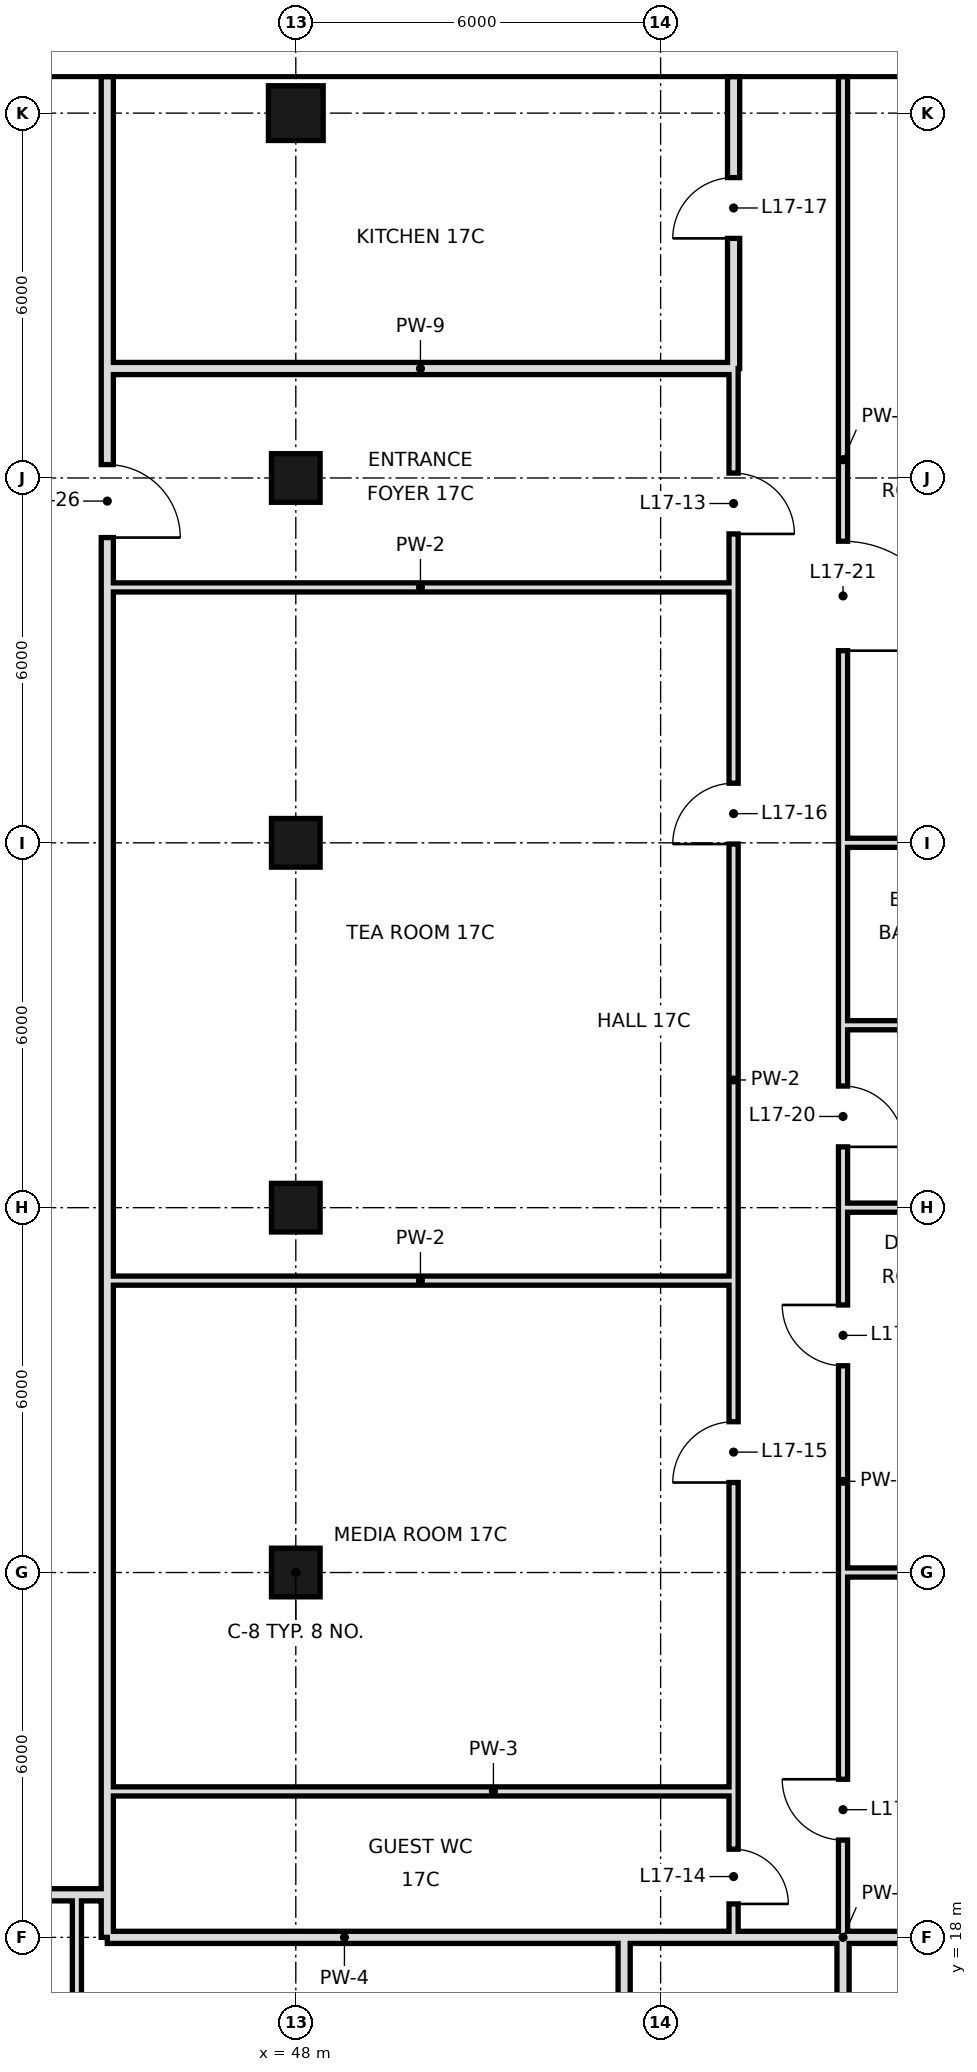
"""IFC4 building model, lengths in metres.
Left out: names, types, materials, properties, quantities, classifications, styles, units other than length and angle.
Written with IfcOpenShell. Run it as: python <this file> out.ifc"""

import sys

from ifc_helpers import new_model, si_unit, direction, frame, frame_2d, origin, origin_2d, place, context, subcontext, project, spatial, rectangle, hollow_rectangle, extrude, element, fill, save


model = new_model("IFC4")
c1 = context("Model", 3, precision=1e-05, world=origin(), true_north=direction((0.0, 1.0)))
c2 = subcontext(c1, "Body", "Model", "MODEL_VIEW")
j1 = project(units=[si_unit("LENGTHUNIT", "METRE"), si_unit("PLANEANGLEUNIT", "RADIAN")], contexts=[c1])
p1 = place(None, origin())
s1 = spatial("IfcSite", under=j1, at=p1, CompositionType="ELEMENT")
p2 = place(p1, origin())
s2 = spatial("IfcBuilding", under=s1, at=p2, CompositionType="ELEMENT")
p3 = place(p2, frame((0.0, 0.0, 82.2)))
s3 = spatial("IfcBuildingStorey", under=s2, at=p3, CompositionType="ELEMENT", Elevation=82.2)
for number, where, z_axis, x_axis in (
    (1, (48.0, 24.0, 0.0), (0.0, 0.0, 1.0), (1.0, 0.0, 0.0)),
    (2, (48.0, 30.0, 0.0), (0.0, 0.0, 1.0), (1.0, 0.0, 0.0)),
    (3, (48.0, 36.0, 0.0), (0.0, 0.0, 1.0), (1.0, 0.0, 0.0)),
    (4, (48.0, 42.0, 0.0), (0.0, 0.0, 1.0), (1.0, 0.0, 0.0)),
):
    element("IfcColumn", number, at=place(p3, frame(where, z_axis=z_axis, x_axis=x_axis)), inside=s3, PredefinedType="COLUMN", context=c2, shape_type="SweptSolid", body=[
        extrude(hollow_rectangle(XDim=0.8, YDim=0.8, WallThickness=0.04, at=origin_2d()), origin(), (0.0, 0.0, 1.0), 3.6),
    ])
p4 = place(p3, frame((48.0, 48.0, 0.0), z_axis=(0.0, 0.0, 1.0), x_axis=(1.0, 0.0, 0.0)))
e5 = element("IfcColumn", 5, at=p4, inside=s3, PredefinedType="COLUMN", context=c2, shape_type="SweptSolid", body=[
    extrude(hollow_rectangle(XDim=0.9, YDim=0.9, WallThickness=0.045, at=origin_2d()), origin(), (0.0, 0.0, 1.0), 3.6),
])
p5 = place(p3, frame((44.4, 10.8, 0.0), z_axis=(0.0, 0.0, 1.0), x_axis=(0.0, 1.0, 0.0)))
e6 = element("IfcWall", 6, at=p5, inside=s3, PredefinedType="PARTITIONING", context=c2, shape_type="SweptSolid", body=[
    extrude(rectangle(XDim=7.9, YDim=0.15, at=frame_2d((3.95, 0.0))), origin(), (0.0, 0.0, 1.0), 3.42),
])
p6 = place(p3, frame((44.9, 18.7, 0.0), z_axis=(0.0, 0.0, 1.0), x_axis=(0.0, 1.0, 0.0)))
e7 = element("IfcWall", 7, at=p6, inside=s3, PredefinedType="SOLIDWALL", context=c2, shape_type="SweptSolid", body=[
    extrude(rectangle(XDim=25.1, YDim=0.2, at=frame_2d((12.55, 0.0))), origin(), (0.0, 0.0, 1.0), 2.97),
])
p7 = place(p6, frame((22.32, 0.0, 0.0)))
e8 = element("IfcOpeningElement", 8, at=p7, cuts=e7, PredefinedType="OPENING", context=c2, shape_type="SweptSolid", body=[
    extrude(rectangle(XDim=1.2, YDim=2.4, at=frame_2d((0.6, 1.2))), frame((0.0, 0.11, 0.0), z_axis=(0.0, -1.0, 0.0), x_axis=(1.0, 0.0, 0.0)), (0.0, 0.0, 1.0), 0.22),
])
p8 = place(p3, frame((44.9, 43.8, 0.0), z_axis=(0.0, 0.0, 1.0), x_axis=(0.0, 1.0, 0.0)))
e9 = element("IfcWall", 9, at=p8, inside=s3, PredefinedType="SOLIDWALL", context=c2, shape_type="SweptSolid", body=[
    extrude(rectangle(XDim=4.8, YDim=0.2, at=frame_2d((2.4, 0.0))), origin(), (0.0, 0.0, 1.0), 2.72),
])
p9 = place(p3, frame((44.9, 18.0, 0.0), z_axis=(0.0, 0.0, 1.0), x_axis=(0.0, 1.0, 0.0)))
e10 = element("IfcWall", 10, at=p9, inside=s3, PredefinedType="SOLIDWALL", context=c2, shape_type="SweptSolid", body=[
    extrude(rectangle(XDim=0.7, YDim=0.2, at=frame_2d((0.35, 0.0))), origin(), (0.0, 0.0, 1.0), 2.97),
])
p10 = place(p3, frame((53.4, 10.8, 0.0), z_axis=(0.0, 0.0, 1.0), x_axis=(0.0, 1.0, 0.0)))
e11 = element("IfcWall", 11, at=p10, inside=s3, PredefinedType="SOLIDWALL", context=c2, shape_type="SweptSolid", body=[
    extrude(rectangle(XDim=7.2, YDim=0.2, at=frame_2d((3.6, 0.0))), origin(), (0.0, 0.0, 1.0), 2.52),
])
p11 = place(p3, frame((55.2, 43.8, 0.0), z_axis=(0.0, 0.0, 1.0), x_axis=(0.0, 1.0, 0.0)))
e12 = element("IfcWall", 12, at=p11, inside=s3, PredefinedType="SOLIDWALL", context=c2, shape_type="SweptSolid", body=[
    extrude(rectangle(XDim=4.8, YDim=0.2, at=frame_2d((2.4, 0.0))), origin(), (0.0, 0.0, 1.0), 2.72),
])
p12 = place(p11, frame((2.14, 0.0, 0.0)))
e13 = element("IfcOpeningElement", 13, at=p12, cuts=e12, PredefinedType="OPENING", context=c2, shape_type="SweptSolid", body=[
    extrude(rectangle(XDim=1.0, YDim=2.4, at=frame_2d((0.5, 1.2))), frame((0.0, 0.11, 0.0), z_axis=(0.0, -1.0, 0.0), x_axis=(1.0, 0.0, 0.0)), (0.0, 0.0, 1.0), 0.22),
])
p13 = place(p3, frame((55.2, 20.4, 0.0), z_axis=(0.0, 0.0, 1.0), x_axis=(0.0, 1.0, 0.0)))
e14 = element("IfcWall", 14, at=p13, inside=s3, PredefinedType="PARTITIONING", context=c2, shape_type="SweptSolid", body=[
    extrude(rectangle(XDim=23.4, YDim=0.15, at=frame_2d((11.7, 0.0))), origin(), (0.0, 0.0, 1.0), 3.42),
])
p14 = place(p13, frame((20.68, 0.0, 0.0)))
e15 = element("IfcOpeningElement", 15, at=p14, cuts=e14, PredefinedType="OPENING", context=c2, shape_type="SweptSolid", body=[
    extrude(rectangle(XDim=1.0, YDim=2.4, at=frame_2d((0.5, 1.2))), frame((0.0, 0.085, 0.0), z_axis=(0.0, -1.0, 0.0), x_axis=(1.0, 0.0, 0.0)), (0.0, 0.0, 1.0), 0.17),
])
p15 = place(p13, frame((5.08, 0.0, 0.0)))
e16 = element("IfcOpeningElement", 16, at=p15, cuts=e14, PredefinedType="OPENING", context=c2, shape_type="SweptSolid", body=[
    extrude(rectangle(XDim=1.0, YDim=2.4, at=frame_2d((0.5, 1.2))), frame((0.0, 0.085, 0.0), z_axis=(0.0, -1.0, 0.0), x_axis=(1.0, 0.0, 0.0)), (0.0, 0.0, 1.0), 0.17),
])
p16 = place(p13, frame((15.58, 0.0, 0.0)))
e17 = element("IfcOpeningElement", 17, at=p16, cuts=e14, PredefinedType="OPENING", context=c2, shape_type="SweptSolid", body=[
    extrude(rectangle(XDim=1.0, YDim=2.4, at=frame_2d((0.5, 1.2))), frame((0.0, 0.085, 0.0), z_axis=(0.0, -1.0, 0.0), x_axis=(1.0, 0.0, 0.0)), (0.0, 0.0, 1.0), 0.17),
])
p17 = place(p3, frame((55.2, 18.0, 0.0), z_axis=(0.0, 0.0, 1.0), x_axis=(0.0, 1.0, 0.0)))
e18 = element("IfcWall", 18, at=p17, inside=s3, PredefinedType="PARTITIONING", context=c2, shape_type="SweptSolid", body=[
    extrude(rectangle(XDim=2.4, YDim=0.15, at=frame_2d((1.2, 0.0))), origin(), (0.0, 0.0, 1.0), 3.42),
])
p18 = place(p17, frame((0.55, 0.0, 0.0)))
e19 = element("IfcOpeningElement", 19, at=p18, cuts=e18, PredefinedType="OPENING", context=c2, shape_type="SweptSolid", body=[
    extrude(rectangle(XDim=0.9, YDim=2.4, at=frame_2d((0.45, 1.2))), frame((0.0, 0.085, 0.0), z_axis=(0.0, -1.0, 0.0), x_axis=(1.0, 0.0, 0.0)), (0.0, 0.0, 1.0), 0.17),
])
p19 = place(p3, frame((57.0, 10.8, 0.0), z_axis=(0.0, 0.0, 1.0), x_axis=(0.0, 1.0, 0.0)))
e20 = element("IfcWall", 20, at=p19, inside=s3, PredefinedType="SOLIDWALL", context=c2, shape_type="SweptSolid", body=[
    extrude(rectangle(XDim=7.2, YDim=0.2, at=frame_2d((3.6, 0.0))), origin(), (0.0, 0.0, 1.0), 2.52),
])
p20 = place(p3, frame((57.0, 18.0, 0.0), z_axis=(0.0, 0.0, 1.0), x_axis=(0.0, 1.0, 0.0)))
e21 = element("IfcWall", 21, at=p20, inside=s3, PredefinedType="PARTITIONING", context=c2, shape_type="SweptSolid", body=[
    extrude(rectangle(XDim=15.0, YDim=0.15, at=frame_2d((7.5, 0.0))), origin(), (0.0, 0.0, 1.0), 3.42),
])
p21 = place(p20, frame((1.6, 0.0, 0.0)))
e22 = element("IfcOpeningElement", 22, at=p21, cuts=e21, PredefinedType="OPENING", context=c2, shape_type="SweptSolid", body=[
    extrude(rectangle(XDim=1.0, YDim=2.4, at=frame_2d((0.5, 1.2))), frame((0.0, 0.085, 0.0), z_axis=(0.0, -1.0, 0.0), x_axis=(1.0, 0.0, 0.0)), (0.0, 0.0, 1.0), 0.17),
])
p22 = place(p20, frame((9.4, 0.0, 0.0)))
e23 = element("IfcOpeningElement", 23, at=p22, cuts=e21, PredefinedType="OPENING", context=c2, shape_type="SweptSolid", body=[
    extrude(rectangle(XDim=1.0, YDim=2.4, at=frame_2d((0.5, 1.2))), frame((0.0, 0.085, 0.0), z_axis=(0.0, -1.0, 0.0), x_axis=(1.0, 0.0, 0.0)), (0.0, 0.0, 1.0), 0.17),
])
p23 = place(p20, frame((13.0, 0.0, 0.0)))
e24 = element("IfcOpeningElement", 24, at=p23, cuts=e21, PredefinedType="OPENING", context=c2, shape_type="SweptSolid", body=[
    extrude(rectangle(XDim=1.0, YDim=2.4, at=frame_2d((0.5, 1.2))), frame((0.0, 0.085, 0.0), z_axis=(0.0, -1.0, 0.0), x_axis=(1.0, 0.0, 0.0)), (0.0, 0.0, 1.0), 0.17),
])
p24 = place(p3, frame((57.0, 36.0, 0.0), z_axis=(0.0, 0.0, 1.0), x_axis=(0.0, 1.0, 0.0)))
e25 = element("IfcWall", 25, at=p24, inside=s3, PredefinedType="PARTITIONING", context=c2, shape_type="SweptSolid", body=[
    extrude(rectangle(XDim=12.6, YDim=0.15, at=frame_2d((6.3, 0.0))), origin(), (0.0, 0.0, 1.0), 3.42),
])
p25 = place(p24, frame((3.16, 0.0, 0.0)))
e26 = element("IfcOpeningElement", 26, at=p25, cuts=e25, PredefinedType="OPENING", context=c2, shape_type="SweptSolid", body=[
    extrude(rectangle(XDim=1.8, YDim=2.4, at=frame_2d((0.9, 1.2))), frame((0.0, 0.085, 0.0), z_axis=(0.0, -1.0, 0.0), x_axis=(1.0, 0.0, 0.0)), (0.0, 0.0, 1.0), 0.17),
])
p26 = place(p3, frame((57.0, 33.0, 0.0), z_axis=(0.0, 0.0, 1.0), x_axis=(0.0, 1.0, 0.0)))
e27 = element("IfcWall", 27, at=p26, inside=s3, PredefinedType="PARTITIONING", context=c2, shape_type="SweptSolid", body=[
    extrude(rectangle(XDim=3.0, YDim=0.15, at=frame_2d((1.5, 0.0))), origin(), (0.0, 0.0, 1.0), 3.42),
])
p27 = place(p3, frame((53.4, 18.0, 0.0), z_axis=(0.0, 0.0, 1.0), x_axis=(1.0, 0.0, 0.0)))
e28 = element("IfcWall", 28, at=p27, inside=s3, PredefinedType="SOLIDWALL", context=c2, shape_type="SweptSolid", body=[
    extrude(rectangle(XDim=3.6, YDim=0.2, at=frame_2d((1.8, 0.0))), origin(), (0.0, 0.0, 1.0), 2.52),
])
p28 = place(p3, frame((44.9, 18.0, 0.0), z_axis=(0.0, 0.0, 1.0), x_axis=(1.0, 0.0, 0.0)))
e29 = element("IfcWall", 29, at=p28, inside=s3, PredefinedType="SOLIDWALL", context=c2, shape_type="SweptSolid", body=[
    extrude(rectangle(XDim=8.5, YDim=0.2, at=frame_2d((4.25, 0.0))), origin(), (0.0, 0.0, 1.0), 2.52),
])
p29 = place(p3, frame((57.0, 18.0, 0.0), z_axis=(0.0, 0.0, 1.0), x_axis=(1.0, 0.0, 0.0)))
e30 = element("IfcWall", 30, at=p29, inside=s3, PredefinedType="SOLIDWALL", context=c2, shape_type="SweptSolid", body=[
    extrude(rectangle(XDim=9.6, YDim=0.2, at=frame_2d((4.8, 0.0))), origin(), (0.0, 0.0, 1.0), 2.52),
])
p30 = place(p3, frame((3.1, 18.7, 0.0), z_axis=(0.0, 0.0, 1.0), x_axis=(1.0, 0.0, 0.0)))
e31 = element("IfcWall", 31, at=p30, inside=s3, PredefinedType="SOLIDWALL", context=c2, shape_type="SweptSolid", body=[
    extrude(rectangle(XDim=41.8, YDim=0.2, at=frame_2d((20.9, 0.0))), origin(), (0.0, 0.0, 1.0), 2.72),
])
p31 = place(p30, frame((36.16, 0.0, 0.0)))
e32 = element("IfcOpeningElement", 32, at=p31, cuts=e31, PredefinedType="OPENING", context=c2, shape_type="SweptSolid", body=[
    extrude(rectangle(XDim=1.2, YDim=2.4, at=frame_2d((0.6, 1.2))), frame((0.0, 0.11, 0.0), z_axis=(0.0, -1.0, 0.0), x_axis=(1.0, 0.0, 0.0)), (0.0, 0.0, 1.0), 0.22),
])
p32 = place(p30, frame((15.55, 0.0, 0.0)))
e33 = element("IfcOpeningElement", 33, at=p32, cuts=e31, PredefinedType="OPENING", context=c2, shape_type="SweptSolid", body=[
    extrude(rectangle(XDim=1.8, YDim=2.4, at=frame_2d((0.9, 1.2))), frame((0.0, 0.11, 0.0), z_axis=(0.0, -1.0, 0.0), x_axis=(1.0, 0.0, 0.0)), (0.0, 0.0, 1.0), 0.22),
])
p33 = place(p3, frame((44.9, 20.4, 0.0), z_axis=(0.0, 0.0, 1.0), x_axis=(1.0, 0.0, 0.0)))
e34 = element("IfcWall", 34, at=p33, inside=s3, PredefinedType="PARTITIONING", context=c2, shape_type="SweptSolid", body=[
    extrude(rectangle(XDim=10.3, YDim=0.15, at=frame_2d((5.15, 0.0))), origin(), (0.0, 0.0, 1.0), 3.42),
])
p34 = place(p3, frame((57.0, 24.0, 0.0), z_axis=(0.0, 0.0, 1.0), x_axis=(1.0, 0.0, 0.0)))
e35 = element("IfcWall", 35, at=p34, inside=s3, PredefinedType="PARTITIONING", context=c2, shape_type="SweptSolid", body=[
    extrude(rectangle(XDim=9.0, YDim=0.15, at=frame_2d((4.5, 0.0))), origin(), (0.0, 0.0, 1.0), 2.52),
])
p35 = place(p3, frame((44.9, 28.8, 0.0), z_axis=(0.0, 0.0, 1.0), x_axis=(1.0, 0.0, 0.0)))
e36 = element("IfcWall", 36, at=p35, inside=s3, PredefinedType="PARTITIONING", context=c2, shape_type="SweptSolid", body=[
    extrude(rectangle(XDim=10.3, YDim=0.15, at=frame_2d((5.15, 0.0))), origin(), (0.0, 0.0, 1.0), 3.42),
])
p36 = place(p3, frame((57.0, 30.0, 0.0), z_axis=(0.0, 0.0, 1.0), x_axis=(1.0, 0.0, 0.0)))
e37 = element("IfcWall", 37, at=p36, inside=s3, PredefinedType="PARTITIONING", context=c2, shape_type="SweptSolid", body=[
    extrude(rectangle(XDim=9.6, YDim=0.15, at=frame_2d((4.8, 0.0))), origin(), (0.0, 0.0, 1.0), 2.52),
])
p37 = place(p3, frame((57.0, 33.0, 0.0), z_axis=(0.0, 0.0, 1.0), x_axis=(1.0, 0.0, 0.0)))
e38 = element("IfcWall", 38, at=p37, inside=s3, PredefinedType="PARTITIONING", context=c2, shape_type="SweptSolid", body=[
    extrude(rectangle(XDim=3.0, YDim=0.15, at=frame_2d((1.5, 0.0))), origin(), (0.0, 0.0, 1.0), 3.42),
])
p38 = place(p3, frame((57.0, 36.0, 0.0), z_axis=(0.0, 0.0, 1.0), x_axis=(1.0, 0.0, 0.0)))
e39 = element("IfcWall", 39, at=p38, inside=s3, PredefinedType="PARTITIONING", context=c2, shape_type="SweptSolid", body=[
    extrude(rectangle(XDim=3.0, YDim=0.15, at=frame_2d((1.5, 0.0))), origin(), (0.0, 0.0, 1.0), 2.52),
])
p39 = place(p3, frame((44.9, 40.2, 0.0), z_axis=(0.0, 0.0, 1.0), x_axis=(1.0, 0.0, 0.0)))
e40 = element("IfcWall", 40, at=p39, inside=s3, PredefinedType="PARTITIONING", context=c2, shape_type="SweptSolid", body=[
    extrude(rectangle(XDim=10.3, YDim=0.15, at=frame_2d((5.15, 0.0))), origin(), (0.0, 0.0, 1.0), 3.42),
])
p40 = place(p3, frame((44.9, 43.8, 0.0), z_axis=(0.0, 0.0, 1.0), x_axis=(1.0, 0.0, 0.0)))
e41 = element("IfcWall", 41, at=p40, inside=s3, PredefinedType="SOLIDWALL", context=c2, shape_type="SweptSolid", body=[
    extrude(rectangle(XDim=10.3, YDim=0.2, at=frame_2d((5.15, 0.0))), origin(), (0.0, 0.0, 1.0), 2.97),
])
p41 = place(p14, frame((1.0, 0.0, 0.0), z_axis=(0.0, 0.0, 1.0), x_axis=(-1.0, 0.0, 0.0)))
e42 = element("IfcDoor", 42, at=p41, inside=s3, OperationType="SINGLE_SWING_RIGHT", PredefinedType="DOOR", context=c2, shape_type="SweptSolid", body=[
    extrude(rectangle(XDim=1.0, YDim=2.4, at=frame_2d((0.5, 1.2))), frame((0.0, 0.025, 0.0), z_axis=(0.0, -1.0, 0.0), x_axis=(1.0, 0.0, 0.0)), (0.0, 0.0, 1.0), 0.05),
])
fill(e15, e42)
p42 = place(p18, frame((0.9, 0.0, 0.0), z_axis=(0.0, 0.0, 1.0), x_axis=(-1.0, 0.0, 0.0)))
e43 = element("IfcDoor", 43, at=p42, inside=s3, OperationType="SINGLE_SWING_RIGHT", PredefinedType="DOOR", context=c2, shape_type="SweptSolid", body=[
    extrude(rectangle(XDim=0.9, YDim=2.4, at=frame_2d((0.45, 1.2))), frame((0.0, 0.025, 0.0), z_axis=(0.0, -1.0, 0.0), x_axis=(1.0, 0.0, 0.0)), (0.0, 0.0, 1.0), 0.05),
])
fill(e19, e43)
p43 = place(p15, origin())
e44 = element("IfcDoor", 44, at=p43, inside=s3, OperationType="SINGLE_SWING_LEFT", PredefinedType="DOOR", context=c2, shape_type="SweptSolid", body=[
    extrude(rectangle(XDim=1.0, YDim=2.4, at=frame_2d((0.5, 1.2))), frame((0.0, 0.025, 0.0), z_axis=(0.0, -1.0, 0.0), x_axis=(1.0, 0.0, 0.0)), (0.0, 0.0, 1.0), 0.05),
])
fill(e16, e44)
p44 = place(p16, origin())
e45 = element("IfcDoor", 45, at=p44, inside=s3, OperationType="SINGLE_SWING_LEFT", PredefinedType="DOOR", context=c2, shape_type="SweptSolid", body=[
    extrude(rectangle(XDim=1.0, YDim=2.4, at=frame_2d((0.5, 1.2))), frame((0.0, 0.025, 0.0), z_axis=(0.0, -1.0, 0.0), x_axis=(1.0, 0.0, 0.0)), (0.0, 0.0, 1.0), 0.05),
])
fill(e17, e45)
p45 = place(p12, origin())
e46 = element("IfcDoor", 46, at=p45, inside=s3, OperationType="SINGLE_SWING_LEFT", PredefinedType="DOOR", context=c2, shape_type="SweptSolid", body=[
    extrude(rectangle(XDim=1.0, YDim=2.4, at=frame_2d((0.5, 1.2))), frame((0.0, 0.025, 0.0), z_axis=(0.0, -1.0, 0.0), x_axis=(1.0, 0.0, 0.0)), (0.0, 0.0, 1.0), 0.05),
])
fill(e13, e46)
p46 = place(p21, frame((1.0, 0.0, 0.0), z_axis=(0.0, 0.0, 1.0), x_axis=(-1.0, 0.0, 0.0)))
e47 = element("IfcDoor", 47, at=p46, inside=s3, OperationType="SINGLE_SWING_LEFT", PredefinedType="DOOR", context=c2, shape_type="SweptSolid", body=[
    extrude(rectangle(XDim=1.0, YDim=2.4, at=frame_2d((0.5, 1.2))), frame((0.0, 0.025, 0.0), z_axis=(0.0, -1.0, 0.0), x_axis=(1.0, 0.0, 0.0)), (0.0, 0.0, 1.0), 0.05),
])
fill(e22, e47)
p47 = place(p22, frame((1.0, 0.0, 0.0), z_axis=(0.0, 0.0, 1.0), x_axis=(-1.0, 0.0, 0.0)))
e48 = element("IfcDoor", 48, at=p47, inside=s3, OperationType="SINGLE_SWING_LEFT", PredefinedType="DOOR", context=c2, shape_type="SweptSolid", body=[
    extrude(rectangle(XDim=1.0, YDim=2.4, at=frame_2d((0.5, 1.2))), frame((0.0, 0.025, 0.0), z_axis=(0.0, -1.0, 0.0), x_axis=(1.0, 0.0, 0.0)), (0.0, 0.0, 1.0), 0.05),
])
fill(e23, e48)
p48 = place(p23, frame((1.0, 0.0, 0.0), z_axis=(0.0, 0.0, 1.0), x_axis=(-1.0, 0.0, 0.0)))
e49 = element("IfcDoor", 49, at=p48, inside=s3, OperationType="SINGLE_SWING_RIGHT", PredefinedType="DOOR", context=c2, shape_type="SweptSolid", body=[
    extrude(rectangle(XDim=1.0, YDim=2.4, at=frame_2d((0.5, 1.2))), frame((0.0, 0.025, 0.0), z_axis=(0.0, -1.0, 0.0), x_axis=(1.0, 0.0, 0.0)), (0.0, 0.0, 1.0), 0.05),
])
fill(e24, e49)
p49 = place(p25, frame((1.8, 0.0, 0.0), z_axis=(0.0, 0.0, 1.0), x_axis=(-1.0, 0.0, 0.0)))
e50 = element("IfcDoor", 50, at=p49, inside=s3, OperationType="SINGLE_SWING_RIGHT", PredefinedType="DOOR", context=c2, shape_type="SweptSolid", body=[
    extrude(rectangle(XDim=1.8, YDim=2.4, at=frame_2d((0.9, 1.2))), frame((0.0, 0.025, 0.0), z_axis=(0.0, -1.0, 0.0), x_axis=(1.0, 0.0, 0.0)), (0.0, 0.0, 1.0), 0.05),
])
fill(e26, e50)
p50 = place(p7, frame((1.2, 0.0, 0.0), z_axis=(0.0, 0.0, 1.0), x_axis=(-1.0, 0.0, 0.0)))
e51 = element("IfcDoor", 51, at=p50, inside=s3, OperationType="SINGLE_SWING_RIGHT", PredefinedType="DOOR", context=c2, shape_type="SweptSolid", body=[
    extrude(rectangle(XDim=1.2, YDim=2.4, at=frame_2d((0.6, 1.2))), frame((0.0, 0.025, 0.0), z_axis=(0.0, -1.0, 0.0), x_axis=(1.0, 0.0, 0.0)), (0.0, 0.0, 1.0), 0.05),
])
fill(e8, e51)
save(model, sys.argv[1])
